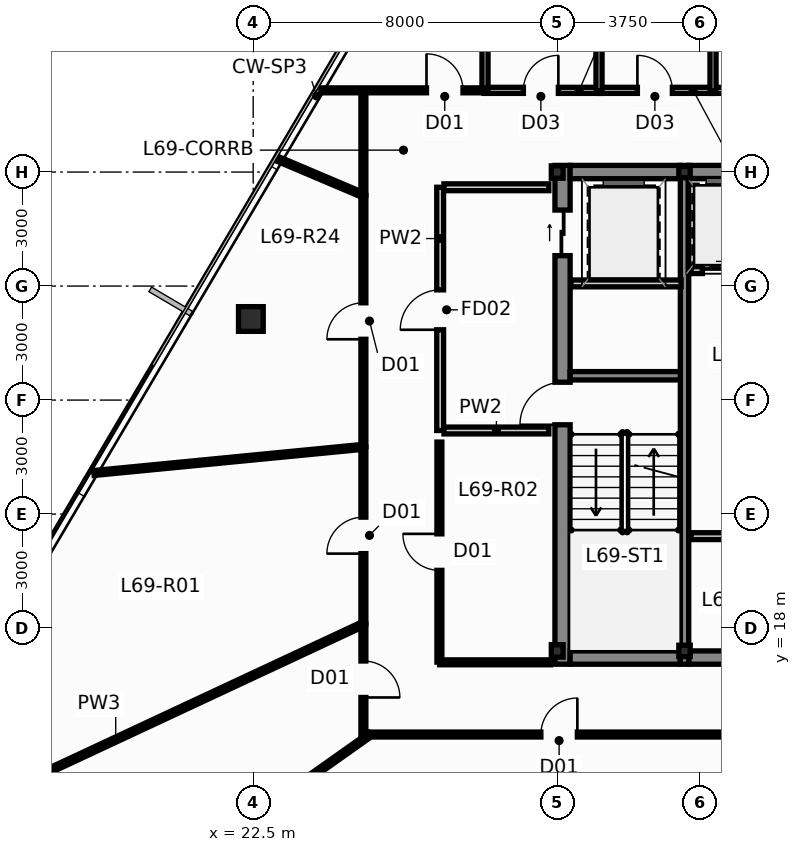
"""IFC4 building model, lengths in metres.
Left out: names, types, materials, properties, quantities, classifications, styles, units other than length and angle.
Written with IfcOpenShell. Run it as: python <this file> out.ifc"""

import sys

from ifc_helpers import new_model, si_unit, direction, frame, frame_2d, origin, origin_2d, place, context, subcontext, project, spatial, rectangle, hollow_rectangle, i_section, extrude, source, transform, mapped, element, fill, save


model = new_model("IFC4")
c1 = context("Model", 3, precision=1e-05, world=origin(), true_north=direction((0.0, 1.0)))
c2 = subcontext(c1, "Body", "Model", "MODEL_VIEW")
j1 = project(units=[si_unit("LENGTHUNIT", "METRE"), si_unit("PLANEANGLEUNIT", "RADIAN")], contexts=[c1])
p1 = place(None, origin())
s1 = spatial("IfcSite", under=j1, at=p1, CompositionType="ELEMENT")
p2 = place(p1, origin())
s2 = spatial("IfcBuilding", under=s1, at=p2, CompositionType="ELEMENT")
p3 = place(p2, frame((0.0, 0.0, 262.7)))
s3 = spatial("IfcBuildingStorey", under=s2, at=p3, CompositionType="ELEMENT", Elevation=262.7)
m1 = source(origin(), c2, "Body", "SweptSolid", [
    extrude(i_section(OverallWidth=0.311, OverallDepth=0.327, WebThickness=0.016, FlangeThickness=0.025, at=origin_2d()), origin(), (0.0, 0.0, 1.0), 3.65),
])
for number, where, z_axis, x_axis in (
    (1, (30.5, 17.4, 0.0), (0.0, 0.0, 1.0), (1.0, 0.0, 0.0)),
    (2, (30.5, 30.0, 0.0), (0.0, 0.0, 1.0), (1.0, 0.0, 0.0)),
):
    element("IfcColumn", number, at=place(p3, frame(where, z_axis=z_axis, x_axis=x_axis)), inside=s3, PredefinedType="COLUMN", context=c2, shape_type="MappedRepresentation", body=[
        mapped(m1, transform((0.0, 0.0, 0.0), scale=1.0)),
    ])
m2 = source(origin(), c2, "Body", "SweptSolid", [
    extrude(hollow_rectangle(XDim=0.3, YDim=0.3, WallThickness=0.012, at=origin_2d()), origin(), (0.0, 0.0, 1.0), 3.65),
])
for number, where, z_axis, x_axis in (
    (3, (33.85, 17.4, 0.0), (0.0, 0.0, 1.0), (1.0, 0.0, 0.0)),
    (4, (33.85, 30.0, 0.0), (0.0, 0.0, 1.0), (1.0, 0.0, 0.0)),
):
    element("IfcColumn", number, at=place(p3, frame(where, z_axis=z_axis, x_axis=x_axis)), inside=s3, PredefinedType="COLUMN", context=c2, shape_type="MappedRepresentation", body=[
        mapped(m2, transform((0.0, 0.0, 0.0), scale=1.0)),
    ])
p4 = place(p3, frame((30.64, 17.05, 0.0), z_axis=(0.0, 0.0, 1.0), x_axis=(0.0, 1.0, 0.0)))
e5 = element("IfcWall", 5, at=p4, inside=s3, PredefinedType="SHEAR", context=c2, shape_type="SweptSolid", body=[
    extrude(rectangle(XDim=13.125, YDim=0.4, at=frame_2d((6.562, 0.0))), origin(), (0.0, 0.0, 1.0), 3.65),
])
p5 = place(p4, frame((6.3, 0.0, 0.0)))
e6 = element("IfcOpeningElement", 6, at=p5, cuts=e5, PredefinedType="OPENING", context=c2, shape_type="SweptSolid", body=[
    extrude(rectangle(XDim=1.12, YDim=2.15, at=frame_2d((0.56, 1.075))), frame((0.0, 0.212, 0.0), z_axis=(0.0, -1.0, 0.0), x_axis=(1.0, 0.0, 0.0)), (0.0, 0.0, 1.0), 0.424),
])
p6 = place(p4, frame((10.75, 0.0, 0.0)))
e7 = element("IfcOpeningElement", 7, at=p6, cuts=e5, PredefinedType="OPENING", context=c2, shape_type="SweptSolid", body=[
    extrude(rectangle(XDim=1.2, YDim=2.2, at=frame_2d((0.6, 1.1))), frame((0.0, 0.212, 0.0), z_axis=(0.0, -1.0, 0.0), x_axis=(1.0, 0.0, 0.0)), (0.0, 0.0, 1.0), 0.424),
])
p7 = place(p3, frame((30.84, 17.225, 0.0), z_axis=(0.0, 0.0, 1.0), x_axis=(1.0, 0.0, 0.0)))
e8 = element("IfcWall", 8, at=p7, inside=s3, PredefinedType="SHEAR", context=c2, shape_type="SweptSolid", body=[
    extrude(rectangle(XDim=2.9, YDim=0.35, at=frame_2d((1.45, 0.0))), origin(), (0.0, 0.0, 1.0), 3.65),
])
p8 = place(p3, frame((33.96, 17.225, 0.0), z_axis=(0.0, 0.0, 1.0), x_axis=(1.0, 0.0, 0.0)))
e9 = element("IfcWall", 9, at=p8, inside=s3, PredefinedType="SHEAR", context=c2, shape_type="SweptSolid", body=[
    extrude(rectangle(XDim=8.08, YDim=0.35, at=frame_2d((4.04, 0.0))), origin(), (0.0, 0.0, 1.0), 3.65),
])
p9 = place(p3, frame((30.84, 30.0, 0.0), z_axis=(0.0, 0.0, 1.0), x_axis=(1.0, 0.0, 0.0)))
e10 = element("IfcWall", 10, at=p9, inside=s3, PredefinedType="SHEAR", context=c2, shape_type="SweptSolid", body=[
    extrude(rectangle(XDim=2.9, YDim=0.35, at=frame_2d((1.45, 0.0))), origin(), (0.0, 0.0, 1.0), 3.65),
])
p10 = place(p3, frame((33.96, 30.0, 0.0), z_axis=(0.0, 0.0, 1.0), x_axis=(1.0, 0.0, 0.0)))
e11 = element("IfcWall", 11, at=p10, inside=s3, PredefinedType="SHEAR", context=c2, shape_type="SweptSolid", body=[
    extrude(rectangle(XDim=3.78, YDim=0.35, at=frame_2d((1.89, 0.0))), origin(), (0.0, 0.0, 1.0), 3.65),
])
p11 = place(p3, frame((33.85, 17.05, 0.0), z_axis=(0.0, 0.0, 1.0), x_axis=(0.0, 1.0, 0.0)))
e12 = element("IfcWall", 12, at=p11, inside=s3, PredefinedType="SHEAR", context=c2, shape_type="SweptSolid", body=[
    extrude(rectangle(XDim=13.125, YDim=0.22, at=frame_2d((6.562, 0.0))), origin(), (0.0, 0.0, 1.0), 3.65),
])
p12 = place(p3, frame((30.84, 24.64, 0.0), z_axis=(0.0, 0.0, 1.0), x_axis=(1.0, 0.0, 0.0)))
e13 = element("IfcWall", 13, at=p12, inside=s3, PredefinedType="SHEAR", context=c2, shape_type="SweptSolid", body=[
    extrude(rectangle(XDim=2.9, YDim=0.22, at=frame_2d((1.45, 0.0))), origin(), (0.0, 0.0, 1.0), 3.65),
])
m3 = source(origin(), c2, "Body", "SweptSolid", [
    extrude(hollow_rectangle(XDim=0.65, YDim=0.65, WallThickness=0.04, at=origin_2d()), origin(), (0.0, 0.0, 1.0), 3.651),
])
p13 = place(p3, frame((22.439, 26.134, 0.0), z_axis=(0.014912316331, -0.013775502979, 0.999793907933), x_axis=(0.678553674548, 0.734550822447, 0.0)))
e14 = element("IfcColumn", 14, at=p13, inside=s3, PredefinedType="COLUMN", context=c2, shape_type="MappedRepresentation", body=[
    mapped(m3, transform((0.0, 0.0, 0.0), scale=1.0)),
])
p14 = place(p3, frame((34.02, 27.42, 0.0), z_axis=(0.0, 0.0, 1.0), x_axis=(1.0, 0.0, 0.0)))
e15 = element("IfcWall", 15, at=p14, inside=s3, PredefinedType="PARTITIONING", context=c2, shape_type="SweptSolid", body=[
    extrude(rectangle(XDim=3.66, YDim=0.18, at=frame_2d((1.83, 0.0))), origin(), (0.0, 0.0, 1.0), 3.4),
])
p15 = place(p14, frame((0.3, 0.0, 0.0)))
e16 = element("IfcOpeningElement", 16, at=p15, cuts=e15, PredefinedType="OPENING", context=c2, shape_type="SweptSolid", body=[
    extrude(rectangle(XDim=1.15, YDim=2.2, at=frame_2d((0.575, 1.1))), frame((0.0, 0.102, 0.0), z_axis=(0.0, -1.0, 0.0), x_axis=(1.0, 0.0, 0.0)), (0.0, 0.0, 1.0), 0.204),
])
p16 = place(p14, frame((2.1, 0.0, 0.0)))
e17 = element("IfcOpeningElement", 17, at=p16, cuts=e15, PredefinedType="OPENING", context=c2, shape_type="SweptSolid", body=[
    extrude(rectangle(XDim=1.15, YDim=2.2, at=frame_2d((0.575, 1.1))), frame((0.0, 0.102, 0.0), z_axis=(0.0, -1.0, 0.0), x_axis=(1.0, 0.0, 0.0)), (0.0, 0.0, 1.0), 0.204),
])
p17 = place(p3, frame((27.42, 23.2, 0.0), z_axis=(0.0, 0.0, 1.0), x_axis=(0.0, 1.0, 0.0)))
e18 = element("IfcWall", 18, at=p17, inside=s3, PredefinedType="PARTITIONING", context=c2, shape_type="SweptSolid", body=[
    extrude(rectangle(XDim=6.4, YDim=0.18, at=frame_2d((3.2, 0.0))), origin(), (0.0, 0.0, 1.0), 3.085),
])
p18 = place(p17, frame((2.65, 0.0, 0.0)))
e19 = element("IfcOpeningElement", 19, at=p18, cuts=e18, PredefinedType="OPENING", context=c2, shape_type="SweptSolid", body=[
    extrude(rectangle(XDim=1.05, YDim=2.15, at=frame_2d((0.525, 1.075))), frame((0.0, 0.102, 0.0), z_axis=(0.0, -1.0, 0.0), x_axis=(1.0, 0.0, 0.0)), (0.0, 0.0, 1.0), 0.204),
])
for number, where, z_axis, x_axis in (
    (20, (27.52, 23.2, 0.0), (0.0, 0.0, 1.0), (1.0, 0.0, 0.0)),
    (21, (27.52, 29.6, 0.0), (0.0, 0.0, 1.0), (1.0, 0.0, 0.0)),
):
    element("IfcWall", number, at=place(p3, frame(where, z_axis=z_axis, x_axis=x_axis)), inside=s3, PredefinedType="PARTITIONING", context=c2, shape_type="SweptSolid", body=[
        extrude(rectangle(XDim=2.76, YDim=0.18, at=frame_2d((1.38, 0.0))), origin(), (0.0, 0.0, 1.0), 3.4),
    ])
p19 = place(p3, frame((30.86, 27.07, 0.0), z_axis=(0.0, 0.0, 1.0), x_axis=(1.0, 0.0, 0.0)))
e22 = element("IfcWall", 22, at=p19, inside=s3, PredefinedType="PARTITIONING", context=c2, shape_type="SweptSolid", body=[
    extrude(rectangle(XDim=2.9, YDim=0.18, at=frame_2d((1.45, 0.0))), origin(), (0.0, 0.0, 1.0), 3.4),
])
p20 = place(p3, frame((34.02, 20.42, 0.0), z_axis=(0.0, 0.0, 1.0), x_axis=(1.0, 0.0, 0.0)))
e23 = element("IfcWall", 23, at=p20, inside=s3, PredefinedType="PARTITIONING", context=c2, shape_type="SweptSolid", body=[
    extrude(rectangle(XDim=3.64, YDim=0.18, at=frame_2d((1.82, 0.0))), origin(), (0.0, 0.0, 1.0), 3.4),
])
p21 = place(p3, frame((28.575, 32.15, 0.0), z_axis=(0.0, 0.0, 1.0), x_axis=(1.0, 0.0, 0.0)))
e24 = element("IfcWall", 24, at=p21, inside=s3, PredefinedType="PLUMBINGWALL", context=c2, shape_type="SweptSolid", body=[
    extrude(rectangle(XDim=3.05, YDim=0.16, at=frame_2d((1.525, 0.0))), origin(), (0.0, 0.0, 1.0), 3.085),
])
p22 = place(p21, frame((1.035, 0.0, 0.0)))
e25 = element("IfcOpeningElement", 25, at=p22, cuts=e24, PredefinedType="OPENING", context=c2, shape_type="SweptSolid", body=[
    extrude(rectangle(XDim=0.92, YDim=2.1, at=frame_2d((0.46, 1.05))), frame((0.0, 0.092, 0.0), z_axis=(0.0, -1.0, 0.0), x_axis=(1.0, 0.0, 0.0)), (0.0, 0.0, 1.0), 0.184),
])
p23 = place(p3, frame((31.575, 32.15, 0.0), z_axis=(0.0, 0.0, 1.0), x_axis=(1.0, 0.0, 0.0)))
e26 = element("IfcWall", 26, at=p23, inside=s3, PredefinedType="PLUMBINGWALL", context=c2, shape_type="SweptSolid", body=[
    extrude(rectangle(XDim=3.05, YDim=0.16, at=frame_2d((1.525, 0.0))), origin(), (0.0, 0.0, 1.0), 3.085),
])
p24 = place(p23, frame((1.035, 0.0, 0.0)))
e27 = element("IfcOpeningElement", 27, at=p24, cuts=e26, PredefinedType="OPENING", context=c2, shape_type="SweptSolid", body=[
    extrude(rectangle(XDim=0.92, YDim=2.1, at=frame_2d((0.46, 1.05))), frame((0.0, 0.092, 0.0), z_axis=(0.0, -1.0, 0.0), x_axis=(1.0, 0.0, 0.0)), (0.0, 0.0, 1.0), 0.184),
])
p25 = place(p3, frame((34.575, 32.15, 0.0), z_axis=(0.0, 0.0, 1.0), x_axis=(1.0, 0.0, 0.0)))
e28 = element("IfcWall", 28, at=p25, inside=s3, PredefinedType="PLUMBINGWALL", context=c2, shape_type="SweptSolid", body=[
    extrude(rectangle(XDim=3.05, YDim=0.16, at=frame_2d((1.525, 0.0))), origin(), (0.0, 0.0, 1.0), 3.085),
])
p26 = place(p25, frame((1.035, 0.0, 0.0)))
e29 = element("IfcOpeningElement", 29, at=p26, cuts=e28, PredefinedType="OPENING", context=c2, shape_type="SweptSolid", body=[
    extrude(rectangle(XDim=0.92, YDim=2.1, at=frame_2d((0.46, 1.05))), frame((0.0, 0.092, 0.0), z_axis=(0.0, -1.0, 0.0), x_axis=(1.0, 0.0, 0.0)), (0.0, 0.0, 1.0), 0.184),
])
for number, where, z_axis, x_axis in (
    (30, (31.6, 32.125, 0.0), (0.0, 0.0, 1.0), (0.0, 1.0, 0.0)),
    (31, (28.6, 32.125, 0.0), (0.0, 0.0, 1.0), (0.0, 1.0, 0.0)),
):
    element("IfcWall", number, at=place(p3, frame(where, z_axis=z_axis, x_axis=x_axis)), inside=s3, PredefinedType="PLUMBINGWALL", context=c2, shape_type="SweptSolid", body=[
        extrude(rectangle(XDim=2.85, YDim=0.16, at=frame_2d((1.425, 0.0))), origin(), (0.0, 0.0, 1.0), 2.985),
    ])
p27 = place(p3, frame((34.6, 32.125, 0.0), z_axis=(0.0, 0.0, 1.0), x_axis=(0.0, 1.0, 0.0)))
e32 = element("IfcWall", 32, at=p27, inside=s3, PredefinedType="PLUMBINGWALL", context=c2, shape_type="SweptSolid", body=[
    extrude(rectangle(XDim=2.85, YDim=0.16, at=frame_2d((1.425, 0.0))), origin(), (0.0, 0.0, 1.0), 3.4),
])
p28 = place(p3, frame((12.369, 12.024, 0.0), z_axis=(0.0, 0.0, 1.0), x_axis=(0.906059457016, 0.423150399211, 0.0)))
e33 = element("IfcWall", 33, at=p28, inside=s3, PredefinedType="PARTITIONING", context=c2, shape_type="SweptSolid", body=[
    extrude(rectangle(XDim=14.377, YDim=0.13, at=frame_2d((7.188, 0.0))), origin(), (0.0, 0.0, 1.0), 2.985),
])
p29 = place(p3, frame((25.585, 15.2, 0.0), z_axis=(0.0, 0.0, 1.0), x_axis=(1.0, 0.0, 0.0)))
e34 = element("IfcWall", 34, at=p29, inside=s3, PredefinedType="PARTITIONING", context=c2, shape_type="SweptSolid", body=[
    extrude(rectangle(XDim=9.93, YDim=0.13, at=frame_2d((4.965, 0.0))), origin(), (0.0, 0.0, 1.0), 3.085),
])
p30 = place(p29, frame((4.485, 0.0, 0.0)))
e35 = element("IfcOpeningElement", 35, at=p30, cuts=e34, PredefinedType="OPENING", context=c2, shape_type="SweptSolid", body=[
    extrude(rectangle(XDim=0.96, YDim=2.15, at=frame_2d((0.48, 1.075))), frame((0.0, 0.077, 0.0), z_axis=(0.0, -1.0, 0.0), x_axis=(1.0, 0.0, 0.0)), (0.0, 0.0, 1.0), 0.154),
])
p31 = place(p3, frame((18.308, 22.082, 0.0), z_axis=(0.0, 0.0, 1.0), x_axis=(0.995313993545, 0.096695678568, 0.0)))
e36 = element("IfcWall", 36, at=p31, inside=s3, PredefinedType="PARTITIONING", context=c2, shape_type="SweptSolid", body=[
    extrude(rectangle(XDim=7.12, YDim=0.13, at=frame_2d((3.56, 0.0))), origin(), (0.0, 0.0, 1.0), 3.4),
])
p32 = place(p3, frame((25.4, 22.775, 0.0), z_axis=(0.0, 0.0, 1.0), x_axis=(0.0, 1.0, 0.0)))
e37 = element("IfcWall", 37, at=p32, inside=s3, PredefinedType="PARTITIONING", context=c2, shape_type="SweptSolid", body=[
    extrude(rectangle(XDim=6.61, YDim=0.13, at=frame_2d((3.305, 0.0))), origin(), (0.0, 0.0, 1.0), 3.085),
])
p33 = place(p32, frame((2.825, 0.0, 0.0)))
e38 = element("IfcOpeningElement", 38, at=p33, cuts=e37, PredefinedType="OPENING", context=c2, shape_type="SweptSolid", body=[
    extrude(rectangle(XDim=0.96, YDim=2.15, at=frame_2d((0.48, 1.075))), frame((0.0, 0.077, 0.0), z_axis=(0.0, -1.0, 0.0), x_axis=(1.0, 0.0, 0.0)), (0.0, 0.0, 1.0), 0.154),
])
p34 = place(p3, frame((27.4, 17.105, 0.0), z_axis=(0.0, 0.0, 1.0), x_axis=(0.0, 1.0, 0.0)))
e39 = element("IfcWall", 39, at=p34, inside=s3, PredefinedType="PARTITIONING", context=c2, shape_type="SweptSolid", body=[
    extrude(rectangle(XDim=5.79, YDim=0.13, at=frame_2d((2.895, 0.0))), origin(), (0.0, 0.0, 1.0), 3.085),
])
p35 = place(p34, frame((2.415, 0.0, 0.0)))
e40 = element("IfcOpeningElement", 40, at=p35, cuts=e39, PredefinedType="OPENING", context=c2, shape_type="SweptSolid", body=[
    extrude(rectangle(XDim=0.96, YDim=2.15, at=frame_2d((0.48, 1.075))), frame((0.0, 0.077, 0.0), z_axis=(0.0, -1.0, 0.0), x_axis=(1.0, 0.0, 0.0)), (0.0, 0.0, 1.0), 0.154),
])
p36 = place(p3, frame((20.794, 11.813, 0.0), z_axis=(0.0, 0.0, 1.0), x_axis=(0.816282397539, 0.57765305112, 0.0)))
e41 = element("IfcWall", 41, at=p36, inside=s3, PredefinedType="PARTITIONING", context=c2, shape_type="SweptSolid", body=[
    extrude(rectangle(XDim=5.858, YDim=0.13, at=frame_2d((2.929, 0.0))), origin(), (0.0, 0.0, 1.0), 3.4),
])
p37 = place(p3, frame((25.4, 18.115, 0.0), z_axis=(0.0, 0.0, 1.0), x_axis=(0.0, 1.0, 0.0)))
e42 = element("IfcWall", 42, at=p37, inside=s3, PredefinedType="PARTITIONING", context=c2, shape_type="SweptSolid", body=[
    extrude(rectangle(XDim=4.65, YDim=0.13, at=frame_2d((2.325, 0.0))), origin(), (0.0, 0.0, 1.0), 3.085),
])
p38 = place(p37, frame((1.845, 0.0, 0.0)))
e43 = element("IfcOpeningElement", 43, at=p38, cuts=e42, PredefinedType="OPENING", context=c2, shape_type="SweptSolid", body=[
    extrude(rectangle(XDim=0.96, YDim=2.15, at=frame_2d((0.48, 1.075))), frame((0.0, 0.077, 0.0), z_axis=(0.0, -1.0, 0.0), x_axis=(1.0, 0.0, 0.0)), (0.0, 0.0, 1.0), 0.154),
])
p39 = place(p3, frame((34.571, 11.815, 0.0), z_axis=(0.0, 0.0, 1.0), x_axis=(0.2700426298, 0.962848367133, 0.0)))
e44 = element("IfcWall", 44, at=p39, inside=s3, PredefinedType="PARTITIONING", context=c2, shape_type="SweptSolid", body=[
    extrude(rectangle(XDim=3.51, YDim=0.13, at=frame_2d((1.755, 0.0))), origin(), (0.0, 0.0, 1.0), 3.4),
])
p40 = place(p3, frame((24.28, 32.15, 0.0), z_axis=(0.0, 0.0, 1.0), x_axis=(1.0, 0.0, 0.0)))
e45 = element("IfcWall", 45, at=p40, inside=s3, PredefinedType="PARTITIONING", context=c2, shape_type="SweptSolid", body=[
    extrude(rectangle(XDim=4.315, YDim=0.13, at=frame_2d((2.157, 0.0))), origin(), (0.0, 0.0, 1.0), 3.4),
])
p41 = place(p40, frame((2.78, 0.0, 0.0)))
e46 = element("IfcOpeningElement", 46, at=p41, cuts=e45, PredefinedType="OPENING", context=c2, shape_type="SweptSolid", body=[
    extrude(rectangle(XDim=0.96, YDim=2.15, at=frame_2d((0.48, 1.075))), frame((0.0, 0.077, 0.0), z_axis=(0.0, -1.0, 0.0), x_axis=(1.0, 0.0, 0.0)), (0.0, 0.0, 1.0), 0.154),
])
p42 = place(p3, frame((30.325, 17.1, 0.0), z_axis=(0.0, 0.0, 1.0), x_axis=(-1.0, 0.0, 0.0)))
e47 = element("IfcWall", 47, at=p42, inside=s3, PredefinedType="PARTITIONING", context=c2, shape_type="SweptSolid", body=[
    extrude(rectangle(XDim=2.92, YDim=0.13, at=frame_2d((1.46, 0.0))), origin(), (0.0, 0.0, 1.0), 2.985),
])
p43 = place(p3, frame((25.4, 18.105, 0.0), z_axis=(0.0, 0.0, 1.0), x_axis=(0.0, -1.0, 0.0)))
e48 = element("IfcWall", 48, at=p43, inside=s3, PredefinedType="PARTITIONING", context=c2, shape_type="SweptSolid", body=[
    extrude(rectangle(XDim=2.9, YDim=0.13, at=frame_2d((1.45, 0.0))), origin(), (0.0, 0.0, 1.0), 3.4),
])
p44 = place(p43, frame((0.97, 0.0, 0.0)))
e49 = element("IfcOpeningElement", 49, at=p44, cuts=e48, PredefinedType="OPENING", context=c2, shape_type="SweptSolid", body=[
    extrude(rectangle(XDim=0.96, YDim=2.15, at=frame_2d((0.48, 1.075))), frame((0.0, 0.077, 0.0), z_axis=(0.0, -1.0, 0.0), x_axis=(1.0, 0.0, 0.0)), (0.0, 0.0, 1.0), 0.154),
])
p45 = place(p3, frame((25.4, 29.395, 0.0), z_axis=(0.0, 0.0, 1.0), x_axis=(0.0, 1.0, 0.0)))
e50 = element("IfcWall", 50, at=p45, inside=s3, PredefinedType="PARTITIONING", context=c2, shape_type="SweptSolid", body=[
    extrude(rectangle(XDim=2.75, YDim=0.13, at=frame_2d((1.375, 0.0))), origin(), (0.0, 0.0, 1.0), 3.4),
])
p46 = place(p3, frame((23.181, 30.332, 0.0), z_axis=(0.0, 0.0, 1.0), x_axis=(0.920577358603, -0.390560272977, 0.0)))
e51 = element("IfcWall", 51, at=p46, inside=s3, PredefinedType="PARTITIONING", context=c2, shape_type="SweptSolid", body=[
    extrude(rectangle(XDim=2.406, YDim=0.13, at=frame_2d((1.203, 0.0))), origin(), (0.0, 0.0, 1.0), 3.4),
])
p47 = place(p5, origin())
e52 = element("IfcDoor", 52, at=p47, inside=s3, OperationType="SINGLE_SWING_LEFT", PredefinedType="DOOR", context=c2, shape_type="SweptSolid", body=[
    extrude(rectangle(XDim=1.12, YDim=2.15, at=frame_2d((0.56, 1.075))), frame((0.0, 0.025, 0.0), z_axis=(0.0, -1.0, 0.0), x_axis=(1.0, 0.0, 0.0)), (0.0, 0.0, 1.0), 0.05),
])
fill(e6, e52)
p48 = place(p6, origin())
e53 = element("IfcDoor", 53, at=p48, inside=s3, OperationType="SLIDING_TO_LEFT", PredefinedType="DOOR", context=c2, shape_type="SweptSolid", body=[
    extrude(rectangle(XDim=1.2, YDim=2.2, at=frame_2d((0.6, 1.1))), frame((0.0, 0.025, 0.0), z_axis=(0.0, -1.0, 0.0), x_axis=(1.0, 0.0, 0.0)), (0.0, 0.0, 1.0), 0.05),
])
fill(e7, e53)
p49 = place(p15, origin())
e54 = element("IfcDoor", 54, at=p49, inside=s3, OperationType="SLIDING_TO_RIGHT", PredefinedType="DOOR", context=c2, shape_type="SweptSolid", body=[
    extrude(rectangle(XDim=1.15, YDim=2.2, at=frame_2d((0.575, 1.1))), frame((0.0, 0.025, 0.0), z_axis=(0.0, -1.0, 0.0), x_axis=(1.0, 0.0, 0.0)), (0.0, 0.0, 1.0), 0.05),
])
fill(e16, e54)
p50 = place(p18, origin())
e55 = element("IfcDoor", 55, at=p50, inside=s3, OperationType="SINGLE_SWING_LEFT", PredefinedType="DOOR", context=c2, shape_type="SweptSolid", body=[
    extrude(rectangle(XDim=1.05, YDim=2.15, at=frame_2d((0.525, 1.075))), frame((0.0, 0.025, 0.0), z_axis=(0.0, -1.0, 0.0), x_axis=(1.0, 0.0, 0.0)), (0.0, 0.0, 1.0), 0.05),
])
fill(e19, e55)
p51 = place(p22, origin())
e56 = element("IfcDoor", 56, at=p51, inside=s3, OperationType="SINGLE_SWING_RIGHT", PredefinedType="DOOR", context=c2, shape_type="SweptSolid", body=[
    extrude(rectangle(XDim=0.92, YDim=2.1, at=frame_2d((0.46, 1.05))), frame((0.0, 0.025, 0.0), z_axis=(0.0, -1.0, 0.0), x_axis=(1.0, 0.0, 0.0)), (0.0, 0.0, 1.0), 0.05),
])
fill(e25, e56)
p52 = place(p24, origin())
e57 = element("IfcDoor", 57, at=p52, inside=s3, OperationType="SINGLE_SWING_LEFT", PredefinedType="DOOR", context=c2, shape_type="SweptSolid", body=[
    extrude(rectangle(XDim=0.92, YDim=2.1, at=frame_2d((0.46, 1.05))), frame((0.0, 0.025, 0.0), z_axis=(0.0, -1.0, 0.0), x_axis=(1.0, 0.0, 0.0)), (0.0, 0.0, 1.0), 0.05),
])
fill(e27, e57)
p53 = place(p30, origin())
e58 = element("IfcDoor", 58, at=p53, inside=s3, OperationType="SINGLE_SWING_RIGHT", PredefinedType="DOOR", context=c2, shape_type="SweptSolid", body=[
    extrude(rectangle(XDim=0.96, YDim=2.15, at=frame_2d((0.48, 1.075))), frame((0.0, 0.025, 0.0), z_axis=(0.0, -1.0, 0.0), x_axis=(1.0, 0.0, 0.0)), (0.0, 0.0, 1.0), 0.05),
])
fill(e35, e58)
p54 = place(p33, origin())
e59 = element("IfcDoor", 59, at=p54, inside=s3, OperationType="SINGLE_SWING_LEFT", PredefinedType="DOOR", context=c2, shape_type="SweptSolid", body=[
    extrude(rectangle(XDim=0.96, YDim=2.15, at=frame_2d((0.48, 1.075))), frame((0.0, 0.025, 0.0), z_axis=(0.0, -1.0, 0.0), x_axis=(1.0, 0.0, 0.0)), (0.0, 0.0, 1.0), 0.05),
])
fill(e38, e59)
p55 = place(p35, origin())
e60 = element("IfcDoor", 60, at=p55, inside=s3, OperationType="SINGLE_SWING_RIGHT", PredefinedType="DOOR", context=c2, shape_type="SweptSolid", body=[
    extrude(rectangle(XDim=0.96, YDim=2.15, at=frame_2d((0.48, 1.075))), frame((0.0, 0.025, 0.0), z_axis=(0.0, -1.0, 0.0), x_axis=(1.0, 0.0, 0.0)), (0.0, 0.0, 1.0), 0.05),
])
fill(e40, e60)
p56 = place(p38, origin())
e61 = element("IfcDoor", 61, at=p56, inside=s3, OperationType="SINGLE_SWING_LEFT", PredefinedType="DOOR", context=c2, shape_type="SweptSolid", body=[
    extrude(rectangle(XDim=0.96, YDim=2.15, at=frame_2d((0.48, 1.075))), frame((0.0, 0.025, 0.0), z_axis=(0.0, -1.0, 0.0), x_axis=(1.0, 0.0, 0.0)), (0.0, 0.0, 1.0), 0.05),
])
fill(e43, e61)
p57 = place(p41, origin())
e62 = element("IfcDoor", 62, at=p57, inside=s3, OperationType="SINGLE_SWING_LEFT", PredefinedType="DOOR", context=c2, shape_type="SweptSolid", body=[
    extrude(rectangle(XDim=0.96, YDim=2.15, at=frame_2d((0.48, 1.075))), frame((0.0, 0.025, 0.0), z_axis=(0.0, -1.0, 0.0), x_axis=(1.0, 0.0, 0.0)), (0.0, 0.0, 1.0), 0.05),
])
fill(e46, e62)
p58 = place(p44, origin())
e63 = element("IfcDoor", 63, at=p58, inside=s3, OperationType="SINGLE_SWING_RIGHT", PredefinedType="DOOR", context=c2, shape_type="SweptSolid", body=[
    extrude(rectangle(XDim=0.96, YDim=2.15, at=frame_2d((0.48, 1.075))), frame((0.0, 0.025, 0.0), z_axis=(0.0, -1.0, 0.0), x_axis=(1.0, 0.0, 0.0)), (0.0, 0.0, 1.0), 0.05),
])
fill(e49, e63)
save(model, sys.argv[1])
